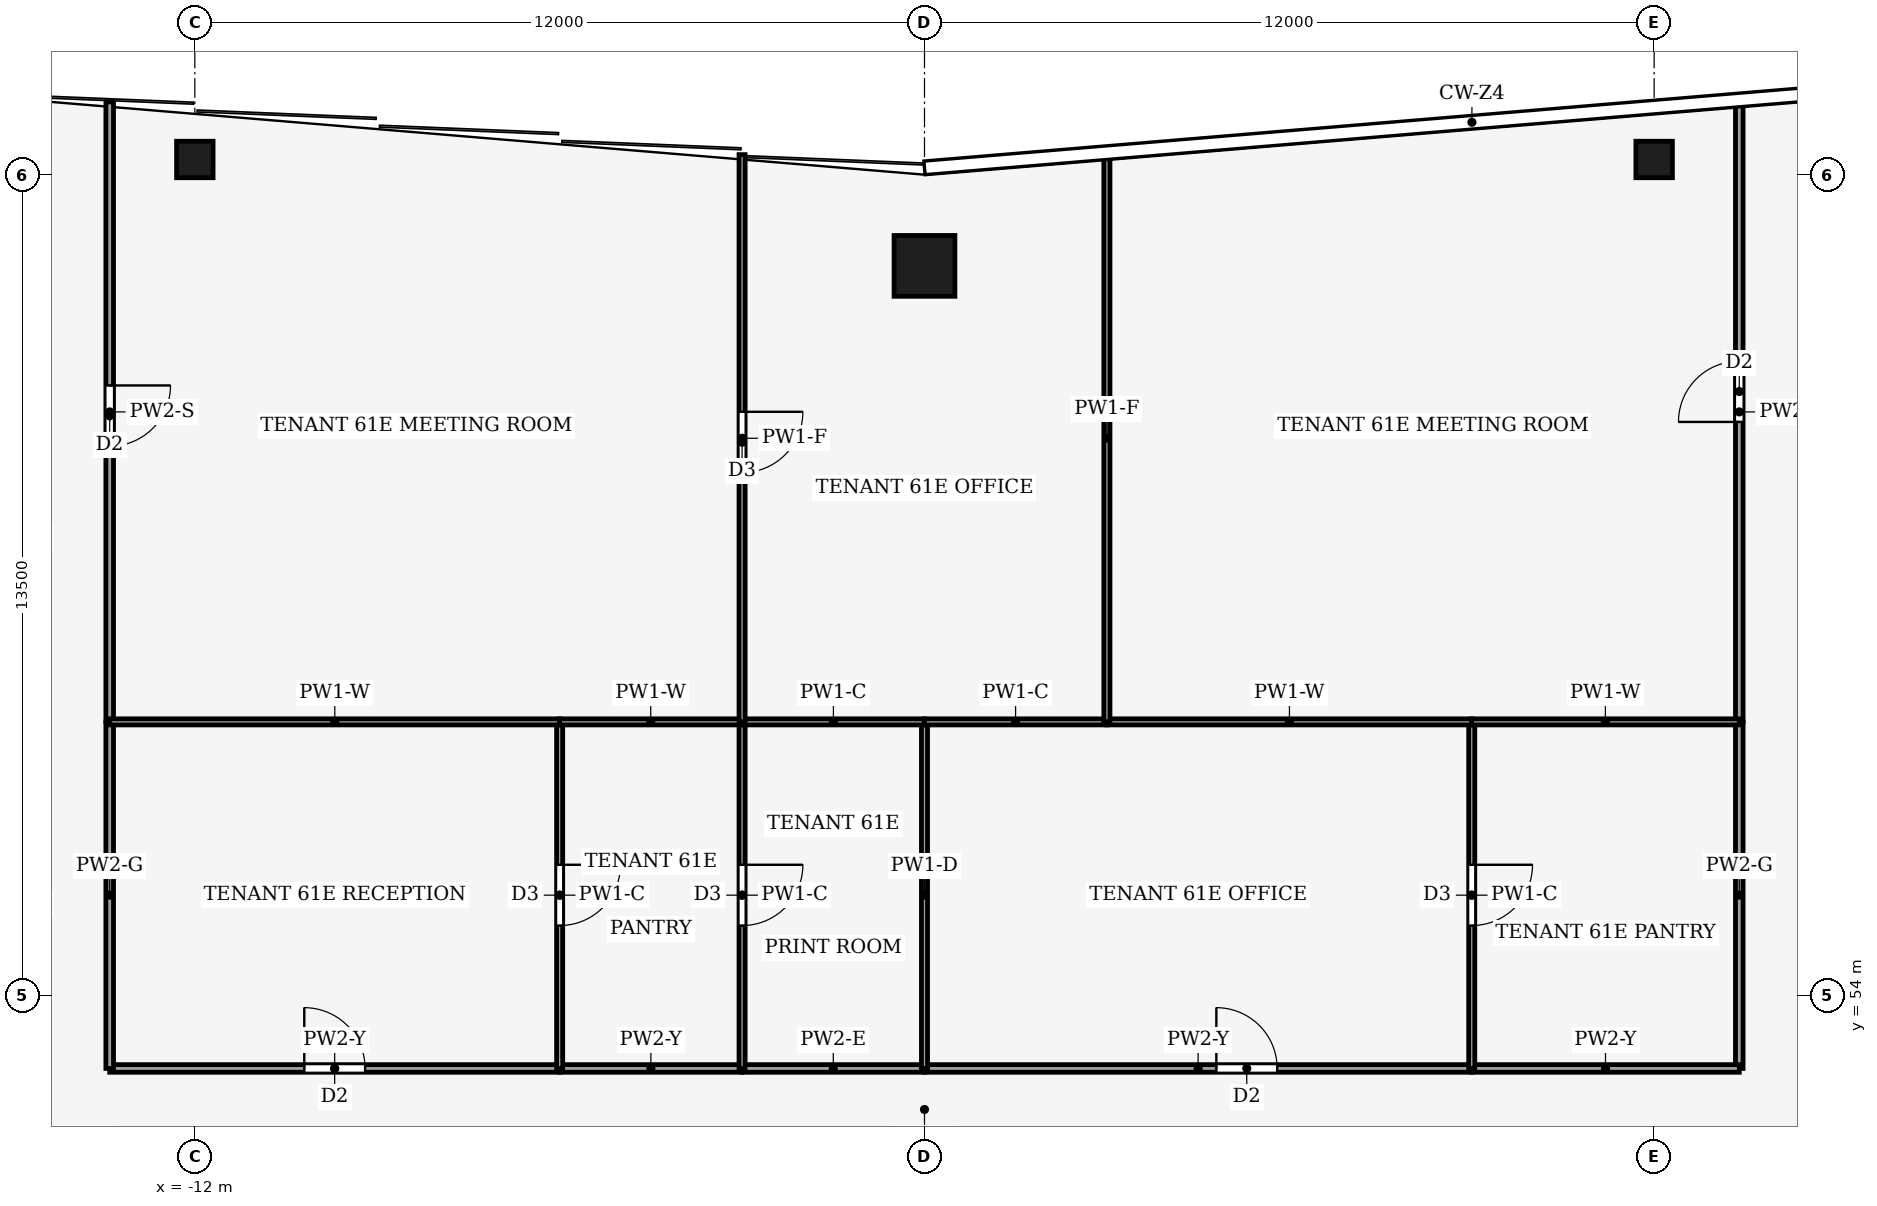
"""IFC4 building model, lengths in metres.
Left out: names, types, materials, properties, quantities, classifications, styles, units other than length and angle.
Written with IfcOpenShell. Run it as: python <this file> out.ifc"""

import sys

from ifc_helpers import new_model, si_unit, direction, frame, frame_2d, origin, origin_2d, place, context, subcontext, project, spatial, rectangle, hollow_rectangle, extrude, element, fill, save


model = new_model("IFC4")
c1 = context("Model", 3, precision=1e-05, world=origin(), true_north=direction((0.0, 1.0)))
c2 = subcontext(c1, "Body", "Model", "MODEL_VIEW")
j1 = project(units=[si_unit("LENGTHUNIT", "METRE"), si_unit("PLANEANGLEUNIT", "RADIAN")], contexts=[c1])
p1 = place(None, origin())
s1 = spatial("IfcSite", under=j1, at=p1, CompositionType="ELEMENT")
p2 = place(p1, origin())
s2 = spatial("IfcBuilding", under=s1, at=p2, CompositionType="ELEMENT")
p3 = place(p2, frame((0.0, 0.0, 266.0)))
s3 = spatial("IfcBuildingStorey", under=s2, at=p3, CompositionType="ELEMENT", Elevation=266.0)
p4 = place(p3, frame((0.0, 66.0, 0.0), z_axis=(0.0, 0.0, 1.0), x_axis=(1.0, 0.0, 0.0)))
e1 = element("IfcColumn", 1, at=p4, inside=s3, PredefinedType="COLUMN", context=c2, shape_type="SweptSolid", body=[
    extrude(hollow_rectangle(XDim=1.0, YDim=1.0, WallThickness=0.045, at=origin_2d()), origin(), (0.0, 0.0, 1.0), 4.0),
])
for number, where, z_axis, x_axis in (
    (2, (-12.0, 67.75, 0.0), (0.0, 0.0, 1.0), (1.0, 0.0, 0.0)),
    (3, (12.0, 67.75, 0.0), (0.0, 0.0, 1.0), (1.0, 0.0, 0.0)),
):
    element("IfcColumn", number, at=place(p3, frame(where, z_axis=z_axis, x_axis=x_axis)), inside=s3, PredefinedType="COLUMN", context=c2, shape_type="SweptSolid", body=[
        extrude(hollow_rectangle(XDim=0.6, YDim=0.6, WallThickness=0.025, at=origin_2d()), origin(), (0.0, 0.0, 1.0), 4.0),
    ])
p5 = place(p3, frame((-13.4, 52.8, 0.0), z_axis=(0.0, 0.0, 1.0), x_axis=(1.0, 0.0, 0.0)))
e4 = element("IfcWall", 4, at=p5, inside=s3, PredefinedType="PARTITIONING", context=c2, shape_type="SweptSolid", body=[
    extrude(rectangle(XDim=7.4, YDim=0.125, at=frame_2d((3.7, 0.0))), origin(), (0.0, 0.0, 1.0), 3.24),
])
p6 = place(p5, frame((3.2, 0.0, 0.0)))
e5 = element("IfcOpeningElement", 5, at=p6, cuts=e4, PredefinedType="OPENING", context=c2, shape_type="SweptSolid", body=[
    extrude(rectangle(XDim=1.0, YDim=2.1, at=frame_2d((0.5, 1.05))), frame((0.0, 0.073, 0.0), z_axis=(0.0, -1.0, 0.0), x_axis=(1.0, 0.0, 0.0)), (0.0, 0.0, 1.0), 0.145),
])
p7 = place(p3, frame((-13.4, 52.8, 0.0), z_axis=(0.0, 0.0, 1.0), x_axis=(0.0, 1.0, 0.0)))
e6 = element("IfcWall", 6, at=p7, inside=s3, PredefinedType="PARTITIONING", context=c2, shape_type="SweptSolid", body=[
    extrude(rectangle(XDim=5.7, YDim=0.125, at=frame_2d((2.85, 0.0))), origin(), (0.0, 0.0, 1.0), 3.87),
])
p8 = place(p3, frame((-3.0, 52.8, 0.0), z_axis=(0.0, 0.0, 1.0), x_axis=(-1.0, 0.0, 0.0)))
e7 = element("IfcWall", 7, at=p8, inside=s3, PredefinedType="PARTITIONING", context=c2, shape_type="SweptSolid", body=[
    extrude(rectangle(XDim=3.0, YDim=0.125, at=frame_2d((1.5, 0.0))), origin(), (0.0, 0.0, 1.0), 3.24),
])
p9 = place(p3, frame((0.0, 52.8, 0.0), z_axis=(0.0, 0.0, 1.0), x_axis=(-1.0, 0.0, 0.0)))
e8 = element("IfcWall", 8, at=p9, inside=s3, PredefinedType="PARTITIONING", context=c2, shape_type="SweptSolid", body=[
    extrude(rectangle(XDim=3.0, YDim=0.125, at=frame_2d((1.5, 0.0))), origin(), (0.0, 0.0, 1.0), 3.29),
])
p10 = place(p3, frame((0.0, 52.8, 0.0), z_axis=(0.0, 0.0, 1.0), x_axis=(1.0, 0.0, 0.0)))
e9 = element("IfcWall", 9, at=p10, inside=s3, PredefinedType="PARTITIONING", context=c2, shape_type="SweptSolid", body=[
    extrude(rectangle(XDim=9.0, YDim=0.125, at=frame_2d((4.5, 0.0))), origin(), (0.0, 0.0, 1.0), 3.24),
])
p11 = place(p10, frame((4.8, 0.0, 0.0)))
e10 = element("IfcOpeningElement", 10, at=p11, cuts=e9, PredefinedType="OPENING", context=c2, shape_type="SweptSolid", body=[
    extrude(rectangle(XDim=1.0, YDim=2.1, at=frame_2d((0.5, 1.05))), frame((0.0, 0.073, 0.0), z_axis=(0.0, -1.0, 0.0), x_axis=(1.0, 0.0, 0.0)), (0.0, 0.0, 1.0), 0.145),
])
p12 = place(p3, frame((13.4, 52.8, 0.0), z_axis=(0.0, 0.0, 1.0), x_axis=(0.0, 1.0, 0.0)))
e11 = element("IfcWall", 11, at=p12, inside=s3, PredefinedType="PARTITIONING", context=c2, shape_type="SweptSolid", body=[
    extrude(rectangle(XDim=5.7, YDim=0.125, at=frame_2d((2.85, 0.0))), origin(), (0.0, 0.0, 1.0), 3.87),
])
p13 = place(p3, frame((13.4, 52.8, 0.0), z_axis=(0.0, 0.0, 1.0), x_axis=(-1.0, 0.0, 0.0)))
e12 = element("IfcWall", 12, at=p13, inside=s3, PredefinedType="PARTITIONING", context=c2, shape_type="SweptSolid", body=[
    extrude(rectangle(XDim=4.4, YDim=0.125, at=frame_2d((2.2, 0.0))), origin(), (0.0, 0.0, 1.0), 3.24),
])
p14 = place(p3, frame((-13.4, 68.697, 0.0), z_axis=(0.0, 0.0, 1.0), x_axis=(0.0, -1.0, 0.0)))
e13 = element("IfcWall", 13, at=p14, inside=s3, PredefinedType="PARTITIONING", context=c2, shape_type="SweptSolid", body=[
    extrude(rectangle(XDim=10.197, YDim=0.125, at=frame_2d((5.098, 0.0))), origin(), (0.0, 0.0, 1.0), 3.04),
])
p15 = place(p14, frame((4.663, 0.0, 0.0)))
e14 = element("IfcOpeningElement", 14, at=p15, cuts=e13, PredefinedType="OPENING", context=c2, shape_type="SweptSolid", body=[
    extrude(rectangle(XDim=1.0, YDim=2.1, at=frame_2d((0.5, 1.05))), frame((0.0, 0.073, 0.0), z_axis=(0.0, -1.0, 0.0), x_axis=(1.0, 0.0, 0.0)), (0.0, 0.0, 1.0), 0.145),
])
p16 = place(p3, frame((13.4, 58.5, 0.0), z_axis=(0.0, 0.0, 1.0), x_axis=(0.0, 1.0, 0.0)))
e15 = element("IfcWall", 15, at=p16, inside=s3, PredefinedType="PARTITIONING", context=c2, shape_type="SweptSolid", body=[
    extrude(rectangle(XDim=10.197, YDim=0.125, at=frame_2d((5.098, 0.0))), origin(), (0.0, 0.0, 1.0), 3.04),
])
p17 = place(p16, frame((4.933, 0.0, 0.0)))
e16 = element("IfcOpeningElement", 16, at=p17, cuts=e15, PredefinedType="OPENING", context=c2, shape_type="SweptSolid", body=[
    extrude(rectangle(XDim=1.0, YDim=2.1, at=frame_2d((0.5, 1.05))), frame((0.0, 0.073, 0.0), z_axis=(0.0, -1.0, 0.0), x_axis=(1.0, 0.0, 0.0)), (0.0, 0.0, 1.0), 0.145),
])
p18 = place(p3, frame((-6.0, 58.5, 0.0), z_axis=(0.0, 0.0, 1.0), x_axis=(0.0, -1.0, 0.0)))
e17 = element("IfcWall", 17, at=p18, inside=s3, PredefinedType="PARTITIONING", context=c2, shape_type="SweptSolid", body=[
    extrude(rectangle(XDim=5.7, YDim=0.1, at=frame_2d((2.85, 0.0))), origin(), (0.0, 0.0, 1.0), 3.87),
])
p19 = place(p18, frame((2.35, 0.0, 0.0)))
e18 = element("IfcOpeningElement", 18, at=p19, cuts=e17, PredefinedType="OPENING", context=c2, shape_type="SweptSolid", body=[
    extrude(rectangle(XDim=1.0, YDim=2.1, at=frame_2d((0.5, 1.05))), frame((0.0, 0.06, 0.0), z_axis=(0.0, -1.0, 0.0), x_axis=(1.0, 0.0, 0.0)), (0.0, 0.0, 1.0), 0.12),
])
p20 = place(p3, frame((-5.996, 58.5, 0.0), z_axis=(0.0, 0.0, 1.0), x_axis=(-1.0, 0.0, 0.0)))
e19 = element("IfcWall", 19, at=p20, inside=s3, PredefinedType="PARTITIONING", context=c2, shape_type="SweptSolid", body=[
    extrude(rectangle(XDim=7.404, YDim=0.1, at=frame_2d((3.702, 0.0))), origin(), (0.0, 0.0, 1.0), 3.24),
])
p21 = place(p3, frame((-3.0, 58.5, 0.0), z_axis=(0.0, 0.0, 1.0), x_axis=(0.0, -1.0, 0.0)))
e20 = element("IfcWall", 20, at=p21, inside=s3, PredefinedType="PARTITIONING", context=c2, shape_type="SweptSolid", body=[
    extrude(rectangle(XDim=5.7, YDim=0.1, at=frame_2d((2.85, 0.0))), origin(), (0.0, 0.0, 1.0), 3.87),
])
p22 = place(p21, frame((2.35, 0.0, 0.0)))
e21 = element("IfcOpeningElement", 21, at=p22, cuts=e20, PredefinedType="OPENING", context=c2, shape_type="SweptSolid", body=[
    extrude(rectangle(XDim=1.0, YDim=2.1, at=frame_2d((0.5, 1.05))), frame((0.0, 0.06, 0.0), z_axis=(0.0, -1.0, 0.0), x_axis=(1.0, 0.0, 0.0)), (0.0, 0.0, 1.0), 0.12),
])
p23 = place(p3, frame((-3.0, 58.5, 0.0), z_axis=(0.0, 0.0, 1.0), x_axis=(-1.0, 0.0, 0.0)))
e22 = element("IfcWall", 22, at=p23, inside=s3, PredefinedType="PARTITIONING", context=c2, shape_type="SweptSolid", body=[
    extrude(rectangle(XDim=3.004, YDim=0.1, at=frame_2d((1.502, 0.0))), origin(), (0.0, 0.0, 1.0), 3.24),
])
p24 = place(p3, frame((0.0, 52.8, 0.0), z_axis=(0.0, 0.0, 1.0), x_axis=(0.0, 1.0, 0.0)))
e23 = element("IfcWall", 23, at=p24, inside=s3, PredefinedType="PARTITIONING", context=c2, shape_type="SweptSolid", body=[
    extrude(rectangle(XDim=5.7, YDim=0.1, at=frame_2d((2.85, 0.0))), origin(), (0.0, 0.0, 1.0), 3.29),
])
p25 = place(p3, frame((0.004, 58.5, 0.0), z_axis=(0.0, 0.0, 1.0), x_axis=(-1.0, 0.0, 0.0)))
e24 = element("IfcWall", 24, at=p25, inside=s3, PredefinedType="PARTITIONING", context=c2, shape_type="SweptSolid", body=[
    extrude(rectangle(XDim=3.004, YDim=0.1, at=frame_2d((1.502, 0.0))), origin(), (0.0, 0.0, 1.0), 3.87),
])
p26 = place(p3, frame((9.0, 58.5, 0.0), z_axis=(0.0, 0.0, 1.0), x_axis=(0.0, -1.0, 0.0)))
e25 = element("IfcWall", 25, at=p26, inside=s3, PredefinedType="PARTITIONING", context=c2, shape_type="SweptSolid", body=[
    extrude(rectangle(XDim=5.7, YDim=0.1, at=frame_2d((2.85, 0.0))), origin(), (0.0, 0.0, 1.0), 3.87),
])
p27 = place(p26, frame((2.35, 0.0, 0.0)))
e26 = element("IfcOpeningElement", 26, at=p27, cuts=e25, PredefinedType="OPENING", context=c2, shape_type="SweptSolid", body=[
    extrude(rectangle(XDim=1.0, YDim=2.1, at=frame_2d((0.5, 1.05))), frame((0.0, 0.06, 0.0), z_axis=(0.0, -1.0, 0.0), x_axis=(1.0, 0.0, 0.0)), (0.0, 0.0, 1.0), 0.12),
])
p28 = place(p3, frame((3.0, 58.5, 0.0), z_axis=(0.0, 0.0, 1.0), x_axis=(-1.0, 0.0, 0.0)))
e27 = element("IfcWall", 27, at=p28, inside=s3, PredefinedType="PARTITIONING", context=c2, shape_type="SweptSolid", body=[
    extrude(rectangle(XDim=3.004, YDim=0.1, at=frame_2d((1.502, 0.0))), origin(), (0.0, 0.0, 1.0), 3.87),
])
p29 = place(p3, frame((9.004, 58.5, 0.0), z_axis=(0.0, 0.0, 1.0), x_axis=(-1.0, 0.0, 0.0)))
e28 = element("IfcWall", 28, at=p29, inside=s3, PredefinedType="PARTITIONING", context=c2, shape_type="SweptSolid", body=[
    extrude(rectangle(XDim=6.004, YDim=0.1, at=frame_2d((3.002, 0.0))), origin(), (0.0, 0.0, 1.0), 3.24),
])
p30 = place(p3, frame((13.4, 58.5, 0.0), z_axis=(0.0, 0.0, 1.0), x_axis=(-1.0, 0.0, 0.0)))
e29 = element("IfcWall", 29, at=p30, inside=s3, PredefinedType="PARTITIONING", context=c2, shape_type="SweptSolid", body=[
    extrude(rectangle(XDim=4.404, YDim=0.1, at=frame_2d((2.202, 0.0))), origin(), (0.0, 0.0, 1.0), 3.24),
])
p31 = place(p3, frame((-3.0, 67.83, 0.0), z_axis=(0.0, 0.0, 1.0), x_axis=(0.0, -1.0, 0.0)))
e30 = element("IfcWall", 30, at=p31, inside=s3, PredefinedType="PARTITIONING", context=c2, shape_type="SweptSolid", body=[
    extrude(rectangle(XDim=9.33, YDim=0.1, at=frame_2d((4.665, 0.0))), origin(), (0.0, 0.0, 1.0), 3.04),
])
p32 = place(p31, frame((4.23, 0.0, 0.0)))
e31 = element("IfcOpeningElement", 31, at=p32, cuts=e30, PredefinedType="OPENING", context=c2, shape_type="SweptSolid", body=[
    extrude(rectangle(XDim=1.0, YDim=2.1, at=frame_2d((0.5, 1.05))), frame((0.0, 0.06, 0.0), z_axis=(0.0, -1.0, 0.0), x_axis=(1.0, 0.0, 0.0)), (0.0, 0.0, 1.0), 0.12),
])
p33 = place(p3, frame((3.0, 58.5, 0.0), z_axis=(0.0, 0.0, 1.0), x_axis=(0.0, 1.0, 0.0)))
e32 = element("IfcWall", 32, at=p33, inside=s3, PredefinedType="PARTITIONING", context=c2, shape_type="SweptSolid", body=[
    extrude(rectangle(XDim=9.33, YDim=0.1, at=frame_2d((4.665, 0.0))), origin(), (0.0, 0.0, 1.0), 3.04),
])
p34 = place(p6, origin())
e33 = element("IfcDoor", 33, at=p34, inside=s3, OperationType="SINGLE_SWING_LEFT", PredefinedType="DOOR", context=c2, shape_type="SweptSolid", body=[
    extrude(rectangle(XDim=1.0, YDim=2.1, at=frame_2d((0.5, 1.05))), frame((0.0, 0.025, 0.0), z_axis=(0.0, -1.0, 0.0), x_axis=(1.0, 0.0, 0.0)), (0.0, 0.0, 1.0), 0.05),
])
fill(e5, e33)
p35 = place(p11, origin())
e34 = element("IfcDoor", 34, at=p35, inside=s3, OperationType="SINGLE_SWING_RIGHT", PredefinedType="DOOR", context=c2, shape_type="SweptSolid", body=[
    extrude(rectangle(XDim=1.0, YDim=2.1, at=frame_2d((0.5, 1.05))), frame((0.0, 0.025, 0.0), z_axis=(0.0, -1.0, 0.0), x_axis=(1.0, 0.0, 0.0)), (0.0, 0.0, 1.0), 0.05),
])
fill(e10, e34)
p36 = place(p15, origin())
e35 = element("IfcDoor", 35, at=p36, inside=s3, OperationType="SINGLE_SWING_RIGHT", PredefinedType="DOOR", context=c2, shape_type="SweptSolid", body=[
    extrude(rectangle(XDim=1.0, YDim=2.1, at=frame_2d((0.5, 1.05))), frame((0.0, 0.025, 0.0), z_axis=(0.0, -1.0, 0.0), x_axis=(1.0, 0.0, 0.0)), (0.0, 0.0, 1.0), 0.05),
])
fill(e14, e35)
p37 = place(p17, origin())
e36 = element("IfcDoor", 36, at=p37, inside=s3, OperationType="SINGLE_SWING_RIGHT", PredefinedType="DOOR", context=c2, shape_type="SweptSolid", body=[
    extrude(rectangle(XDim=1.0, YDim=2.1, at=frame_2d((0.5, 1.05))), frame((0.0, 0.025, 0.0), z_axis=(0.0, -1.0, 0.0), x_axis=(1.0, 0.0, 0.0)), (0.0, 0.0, 1.0), 0.05),
])
fill(e16, e36)
p38 = place(p19, origin())
e37 = element("IfcDoor", 37, at=p38, inside=s3, OperationType="SINGLE_SWING_RIGHT", PredefinedType="DOOR", context=c2, shape_type="SweptSolid", body=[
    extrude(rectangle(XDim=1.0, YDim=2.1, at=frame_2d((0.5, 1.05))), frame((0.0, 0.025, 0.0), z_axis=(0.0, -1.0, 0.0), x_axis=(1.0, 0.0, 0.0)), (0.0, 0.0, 1.0), 0.05),
])
fill(e18, e37)
p39 = place(p22, origin())
e38 = element("IfcDoor", 38, at=p39, inside=s3, OperationType="SINGLE_SWING_LEFT", PredefinedType="DOOR", context=c2, shape_type="SweptSolid", body=[
    extrude(rectangle(XDim=1.0, YDim=2.1, at=frame_2d((0.5, 1.05))), frame((0.0, 0.025, 0.0), z_axis=(0.0, -1.0, 0.0), x_axis=(1.0, 0.0, 0.0)), (0.0, 0.0, 1.0), 0.05),
])
fill(e21, e38)
p40 = place(p27, origin())
e39 = element("IfcDoor", 39, at=p40, inside=s3, OperationType="SINGLE_SWING_RIGHT", PredefinedType="DOOR", context=c2, shape_type="SweptSolid", body=[
    extrude(rectangle(XDim=1.0, YDim=2.1, at=frame_2d((0.5, 1.05))), frame((0.0, 0.025, 0.0), z_axis=(0.0, -1.0, 0.0), x_axis=(1.0, 0.0, 0.0)), (0.0, 0.0, 1.0), 0.05),
])
fill(e26, e39)
p41 = place(p32, origin())
e40 = element("IfcDoor", 40, at=p41, inside=s3, OperationType="SINGLE_SWING_RIGHT", PredefinedType="DOOR", context=c2, shape_type="SweptSolid", body=[
    extrude(rectangle(XDim=1.0, YDim=2.1, at=frame_2d((0.5, 1.05))), frame((0.0, 0.025, 0.0), z_axis=(0.0, -1.0, 0.0), x_axis=(1.0, 0.0, 0.0)), (0.0, 0.0, 1.0), 0.05),
])
fill(e31, e40)
save(model, sys.argv[1])
